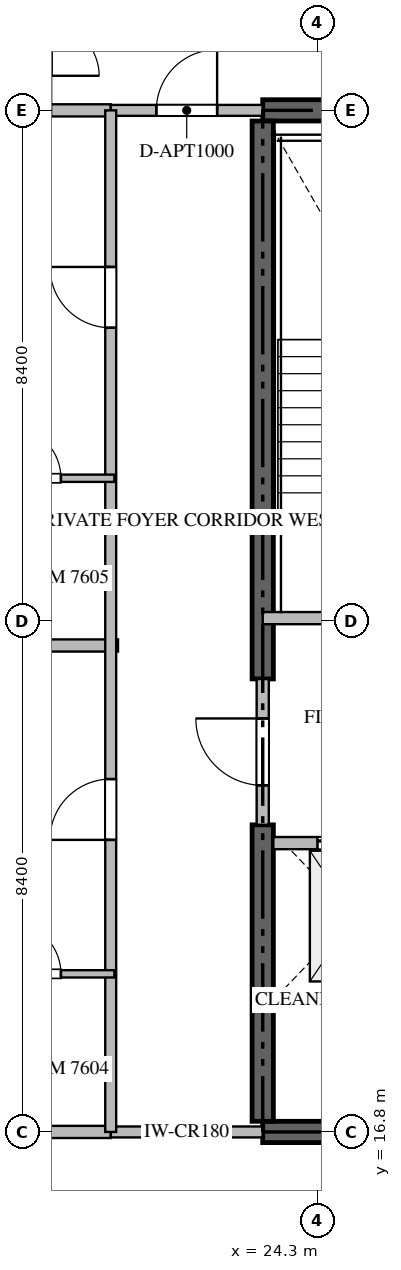
"""IFC4 building model, lengths in metres.
Left out: names, types, materials, properties, quantities, classifications, styles, units other than length and angle.
Written with IfcOpenShell. Run it as: python <this file> out.ifc"""

import sys

from ifc_helpers import new_model, si_unit, direction, frame, frame_2d, origin, place, context, subcontext, project, spatial, rectangle, extrude, source, transform, mapped, element, fill, save


model = new_model("IFC4")
c1 = context("Model", 3, precision=1e-05, world=origin(), true_north=direction((0.0, 1.0)))
c2 = subcontext(c1, "Body", "Model", "MODEL_VIEW")
j1 = project(units=[si_unit("LENGTHUNIT", "METRE"), si_unit("PLANEANGLEUNIT", "RADIAN")], contexts=[c1])
p1 = place(None, origin())
s1 = spatial("IfcSite", under=j1, at=p1, CompositionType="ELEMENT")
p2 = place(p1, origin())
s2 = spatial("IfcBuilding", under=s1, at=p2, CompositionType="ELEMENT")
p3 = place(p2, frame((0.0, 0.0, 305.6)))
s3 = spatial("IfcBuildingStorey", under=s2, at=p3, CompositionType="ELEMENT", Elevation=305.6)
for number, where, z_axis, x_axis in (
    (1, (23.4, 16.8, -0.26), (0.0, 0.0, 1.0), (1.0, 0.0, 0.0)),
    (2, (41.4, 33.6, -0.26), (0.0, 0.0, 1.0), (-1.0, 0.0, 0.0)),
):
    element("IfcWall", number, at=place(p3, frame(where, z_axis=z_axis, x_axis=x_axis)), inside=s3, PredefinedType="SHEAR", context=c2, shape_type="SweptSolid", body=[
        extrude(rectangle(XDim=18.0, YDim=0.35, at=frame_2d((9.0, 0.0))), origin(), (0.0, 0.0, 1.0), 4.048),
    ])
p4 = place(p3, frame((23.4, 16.975, -0.26), z_axis=(0.0, 0.0, 1.0), x_axis=(0.0, 1.0, 0.0)))
e3 = element("IfcWall", 3, at=p4, inside=s3, PredefinedType="SHEAR", context=c2, shape_type="SweptSolid", body=[
    extrude(rectangle(XDim=4.875, YDim=0.35, at=frame_2d((2.438, 0.0))), origin(), (0.0, 0.0, 1.0), 4.048),
])
p5 = place(p3, frame((23.4, 24.25, -0.26), z_axis=(0.0, 0.0, 1.0), x_axis=(0.0, 1.0, 0.0)))
e4 = element("IfcWall", 4, at=p5, inside=s3, PredefinedType="SHEAR", context=c2, shape_type="SweptSolid", body=[
    extrude(rectangle(XDim=9.175, YDim=0.35, at=frame_2d((4.587, 0.0))), origin(), (0.0, 0.0, 1.0), 4.048),
])
p6 = place(p3, frame((23.4, 25.25, 0.0), z_axis=(0.0, 0.0, 1.0), x_axis=(1.0, 0.0, 0.0)))
e5 = element("IfcWall", 5, at=p6, inside=s3, PredefinedType="STANDARD", context=c2, shape_type="SweptSolid", body=[
    extrude(rectangle(XDim=4.45, YDim=0.2, at=frame_2d((2.225, 0.0))), origin(), (0.0, 0.0, 1.0), 3.79),
])
p7 = place(p6, frame((1.65, 0.0, 0.0)))
e6 = element("IfcOpeningElement", 6, at=p7, cuts=e5, PredefinedType="OPENING", context=c2, shape_type="SweptSolid", body=[
    extrude(rectangle(XDim=1.1, YDim=2.15, at=frame_2d((0.55, 1.075))), frame((0.0, 0.11, 0.0), z_axis=(0.0, -1.0, 0.0), x_axis=(1.0, 0.0, 0.0)), (0.0, 0.0, 1.0), 0.22),
])
p8 = place(p3, frame((23.575, 21.55, 0.0), z_axis=(0.0, 0.0, 1.0), x_axis=(1.0, 0.0, 0.0)))
e7 = element("IfcWall", 7, at=p8, inside=s3, PredefinedType="STANDARD", context=c2, shape_type="SweptSolid", body=[
    extrude(rectangle(XDim=2.475, YDim=0.2, at=frame_2d((1.238, 0.0))), origin(), (0.0, 0.0, 1.0), 3.79),
])
p9 = place(p8, frame((0.725, 0.0, 0.0)))
e8 = element("IfcOpeningElement", 8, at=p9, cuts=e7, PredefinedType="OPENING", context=c2, shape_type="SweptSolid", body=[
    extrude(rectangle(XDim=1.2, YDim=2.2, at=frame_2d((0.6, 1.1))), frame((0.0, 0.11, 0.0), z_axis=(0.0, -1.0, 0.0), x_axis=(1.0, 0.0, 0.0)), (0.0, 0.0, 1.0), 0.22),
])
p10 = place(p3, frame((23.575, 19.05, 0.0), z_axis=(0.0, 0.0, 1.0), x_axis=(1.0, 0.0, 0.0)))
e9 = element("IfcWall", 9, at=p10, inside=s3, PredefinedType="STANDARD", context=c2, shape_type="SweptSolid", body=[
    extrude(rectangle(XDim=2.475, YDim=0.2, at=frame_2d((1.238, 0.0))), origin(), (0.0, 0.0, 1.0), 3.79),
])
p11 = place(p3, frame((23.4, 21.852, 0.0), z_axis=(0.0, 0.0, 1.0), x_axis=(0.0, 1.0, 0.0)))
e10 = element("IfcWall", 10, at=p11, inside=s3, PredefinedType="STANDARD", context=c2, shape_type="SweptSolid", body=[
    extrude(rectangle(XDim=2.396, YDim=0.2, at=frame_2d((1.198, 0.0))), origin(), (0.0, 0.0, 1.0), 3.79),
])
p12 = place(p11, frame((0.648, 0.0, 0.0)))
e11 = element("IfcOpeningElement", 11, at=p12, cuts=e10, PredefinedType="OPENING", context=c2, shape_type="SweptSolid", body=[
    extrude(rectangle(XDim=1.1, YDim=2.15, at=frame_2d((0.55, 1.075))), frame((0.0, 0.11, 0.0), z_axis=(0.0, -1.0, 0.0), x_axis=(1.0, 0.0, 0.0)), (0.0, 0.0, 1.0), 0.22),
])
p13 = place(p3, frame((9.282, 24.8, 0.0), z_axis=(0.0, 0.0, 1.0), x_axis=(1.0, 0.0, 0.0)))
e12 = element("IfcWall", 12, at=p13, inside=s3, PredefinedType="PARTITIONING", context=c2, shape_type="SweptSolid", body=[
    extrude(rectangle(XDim=11.738, YDim=0.2, at=frame_2d((5.869, 0.0))), origin(), (0.0, 0.0, 1.0), 3.79),
])
for number, where, z_axis, x_axis in (
    (13, (9.282, 16.8, 0.0), (0.0, 0.0, 1.0), (1.0, 0.0, 0.0)),
    (14, (9.282, 33.6, 0.0), (0.0, 0.0, 1.0), (1.0, 0.0, 0.0)),
):
    element("IfcWall", number, at=place(p3, frame(where, z_axis=z_axis, x_axis=x_axis)), inside=s3, PredefinedType="PARTITIONING", context=c2, shape_type="SweptSolid", body=[
        extrude(rectangle(XDim=11.618, YDim=0.2, at=frame_2d((5.809, 0.0))), origin(), (0.0, 0.0, 1.0), 3.79),
    ])
p14 = place(p3, frame((20.902, 16.8, 0.0), z_axis=(0.0, 0.0, 1.0), x_axis=(1.0, 0.0, 0.0)))
e15 = element("IfcWall", 15, at=p14, inside=s3, PredefinedType="PARTITIONING", context=c2, shape_type="SweptSolid", body=[
    extrude(rectangle(XDim=2.496, YDim=0.18, at=frame_2d((1.248, 0.0))), origin(), (0.0, 0.0, 1.0), 3.79),
])
p15 = place(p3, frame((20.902, 33.6, 0.0), z_axis=(0.0, 0.0, 1.0), x_axis=(1.0, 0.0, 0.0)))
e16 = element("IfcWall", 16, at=p15, inside=s3, PredefinedType="PARTITIONING", context=c2, shape_type="SweptSolid", body=[
    extrude(rectangle(XDim=2.496, YDim=0.18, at=frame_2d((1.248, 0.0))), origin(), (0.0, 0.0, 1.0), 3.79),
])
p16 = place(p15, frame((0.748, 0.0, 0.0)))
e17 = element("IfcOpeningElement", 17, at=p16, cuts=e16, PredefinedType="OPENING", context=c2, shape_type="SweptSolid", body=[
    extrude(rectangle(XDim=1.0, YDim=2.15, at=frame_2d((0.5, 1.075))), frame((0.0, 0.1, 0.0), z_axis=(0.0, -1.0, 0.0), x_axis=(1.0, 0.0, 0.0)), (0.0, 0.0, 1.0), 0.2),
])
p17 = place(p3, frame((20.9, 16.8, 0.0), z_axis=(0.0, 0.0, 1.0), x_axis=(0.0, 1.0, 0.0)))
e18 = element("IfcWall", 18, at=p17, inside=s3, PredefinedType="PARTITIONING", context=c2, shape_type="SweptSolid", body=[
    extrude(rectangle(XDim=16.8, YDim=0.18, at=frame_2d((8.4, 0.0))), origin(), (0.0, 0.0, 1.0), 3.79),
])
p18 = place(p17, frame((4.803, 0.0, 0.0)))
e19 = element("IfcOpeningElement", 19, at=p18, cuts=e18, PredefinedType="OPENING", context=c2, shape_type="SweptSolid", body=[
    extrude(rectangle(XDim=1.0, YDim=2.15, at=frame_2d((0.5, 1.075))), frame((0.0, 0.1, 0.0), z_axis=(0.0, -1.0, 0.0), x_axis=(1.0, 0.0, 0.0)), (0.0, 0.0, 1.0), 0.2),
])
p19 = place(p17, frame((13.225, 0.0, 0.0)))
e20 = element("IfcOpeningElement", 20, at=p19, cuts=e18, PredefinedType="OPENING", context=c2, shape_type="SweptSolid", body=[
    extrude(rectangle(XDim=1.0, YDim=2.15, at=frame_2d((0.5, 1.075))), frame((0.0, 0.1, 0.0), z_axis=(0.0, -1.0, 0.0), x_axis=(1.0, 0.0, 0.0)), (0.0, 0.0, 1.0), 0.2),
])
p20 = place(p3, frame((18.352, 19.4, 0.0), z_axis=(0.0, 0.0, 1.0), x_axis=(1.0, 0.0, 0.0)))
e21 = element("IfcWall", 21, at=p20, inside=s3, PredefinedType="PARTITIONING", context=c2, shape_type="SweptSolid", body=[
    extrude(rectangle(XDim=2.608, YDim=0.12, at=frame_2d((1.304, 0.0))), origin(), (0.0, 0.0, 1.0), 3.79),
])
p21 = place(p20, frame((0.879, 0.0, 0.0)))
e22 = element("IfcOpeningElement", 22, at=p21, cuts=e21, PredefinedType="OPENING", context=c2, shape_type="SweptSolid", body=[
    extrude(rectangle(XDim=0.85, YDim=2.1, at=frame_2d((0.425, 1.05))), frame((0.0, 0.07, 0.0), z_axis=(0.0, -1.0, 0.0), x_axis=(1.0, 0.0, 0.0)), (0.0, 0.0, 1.0), 0.14),
])
p22 = place(p3, frame((18.352, 27.55, 0.0), z_axis=(0.0, 0.0, 1.0), x_axis=(1.0, 0.0, 0.0)))
e23 = element("IfcWall", 23, at=p22, inside=s3, PredefinedType="PARTITIONING", context=c2, shape_type="SweptSolid", body=[
    extrude(rectangle(XDim=2.608, YDim=0.12, at=frame_2d((1.304, 0.0))), origin(), (0.0, 0.0, 1.0), 3.79),
])
p23 = place(p22, frame((0.879, 0.0, 0.0)))
e24 = element("IfcOpeningElement", 24, at=p23, cuts=e23, PredefinedType="OPENING", context=c2, shape_type="SweptSolid", body=[
    extrude(rectangle(XDim=0.85, YDim=2.1, at=frame_2d((0.425, 1.05))), frame((0.0, 0.07, 0.0), z_axis=(0.0, -1.0, 0.0), x_axis=(1.0, 0.0, 0.0)), (0.0, 0.0, 1.0), 0.14),
])
m1 = source(origin(), c2, "Body", "SweptSolid", [
    extrude(rectangle(XDim=1.2, YDim=2.2, at=frame_2d((0.6, 1.1))), frame((0.0, 0.025, 0.0), z_axis=(0.0, -1.0, 0.0), x_axis=(1.0, 0.0, 0.0)), (0.0, 0.0, 1.0), 0.05),
])
p24 = place(p9, origin())
e25 = element("IfcDoor", 25, at=p24, inside=s3, OperationType="DOUBLE_DOOR_SLIDING", PredefinedType="DOOR", context=c2, shape_type="MappedRepresentation", body=[
    mapped(m1, transform((0.0, 0.0, 0.0), scale=1.0)),
])
fill(e8, e25)
m2 = source(origin(), c2, "Body", "SweptSolid", [
    extrude(rectangle(XDim=1.1, YDim=2.15, at=frame_2d((0.55, 1.075))), frame((0.0, 0.025, 0.0), z_axis=(0.0, -1.0, 0.0), x_axis=(1.0, 0.0, 0.0)), (0.0, 0.0, 1.0), 0.05),
])
p25 = place(p12, origin())
e26 = element("IfcDoor", 26, at=p25, inside=s3, OperationType="SINGLE_SWING_RIGHT", PredefinedType="DOOR", context=c2, shape_type="MappedRepresentation", body=[
    mapped(m2, transform((0.0, 0.0, 0.0), scale=1.0)),
])
fill(e11, e26)
m3 = source(origin(), c2, "Body", "SweptSolid", [
    extrude(rectangle(XDim=1.0, YDim=2.15, at=frame_2d((0.5, 1.075))), frame((0.0, 0.025, 0.0), z_axis=(0.0, -1.0, 0.0), x_axis=(1.0, 0.0, 0.0)), (0.0, 0.0, 1.0), 0.05),
])
p26 = place(p16, origin())
e27 = element("IfcDoor", 27, at=p26, inside=s3, OperationType="SINGLE_SWING_RIGHT", PredefinedType="DOOR", context=c2, shape_type="MappedRepresentation", body=[
    mapped(m3, transform((0.0, 0.0, 0.0), scale=1.0)),
])
fill(e17, e27)
p27 = place(p18, origin())
e28 = element("IfcDoor", 28, at=p27, inside=s3, OperationType="SINGLE_SWING_LEFT", PredefinedType="DOOR", context=c2, shape_type="MappedRepresentation", body=[
    mapped(m3, transform((0.0, 0.0, 0.0), scale=1.0)),
])
fill(e19, e28)
p28 = place(p19, origin())
e29 = element("IfcDoor", 29, at=p28, inside=s3, OperationType="SINGLE_SWING_RIGHT", PredefinedType="DOOR", context=c2, shape_type="MappedRepresentation", body=[
    mapped(m3, transform((0.0, 0.0, 0.0), scale=1.0)),
])
fill(e20, e29)
m4 = source(origin(), c2, "Body", "SweptSolid", [
    extrude(rectangle(XDim=0.85, YDim=2.1, at=frame_2d((0.425, 1.05))), frame((0.0, 0.025, 0.0), z_axis=(0.0, -1.0, 0.0), x_axis=(1.0, 0.0, 0.0)), (0.0, 0.0, 1.0), 0.05),
])
p29 = place(p21, origin())
e30 = element("IfcDoor", 30, at=p29, inside=s3, OperationType="SINGLE_SWING_LEFT", PredefinedType="DOOR", context=c2, shape_type="MappedRepresentation", body=[
    mapped(m4, transform((0.0, 0.0, 0.0), scale=1.0)),
])
fill(e22, e30)
p30 = place(p23, origin())
e31 = element("IfcDoor", 31, at=p30, inside=s3, OperationType="SINGLE_SWING_LEFT", PredefinedType="DOOR", context=c2, shape_type="MappedRepresentation", body=[
    mapped(m4, transform((0.0, 0.0, 0.0), scale=1.0)),
])
fill(e24, e31)
save(model, sys.argv[1])
